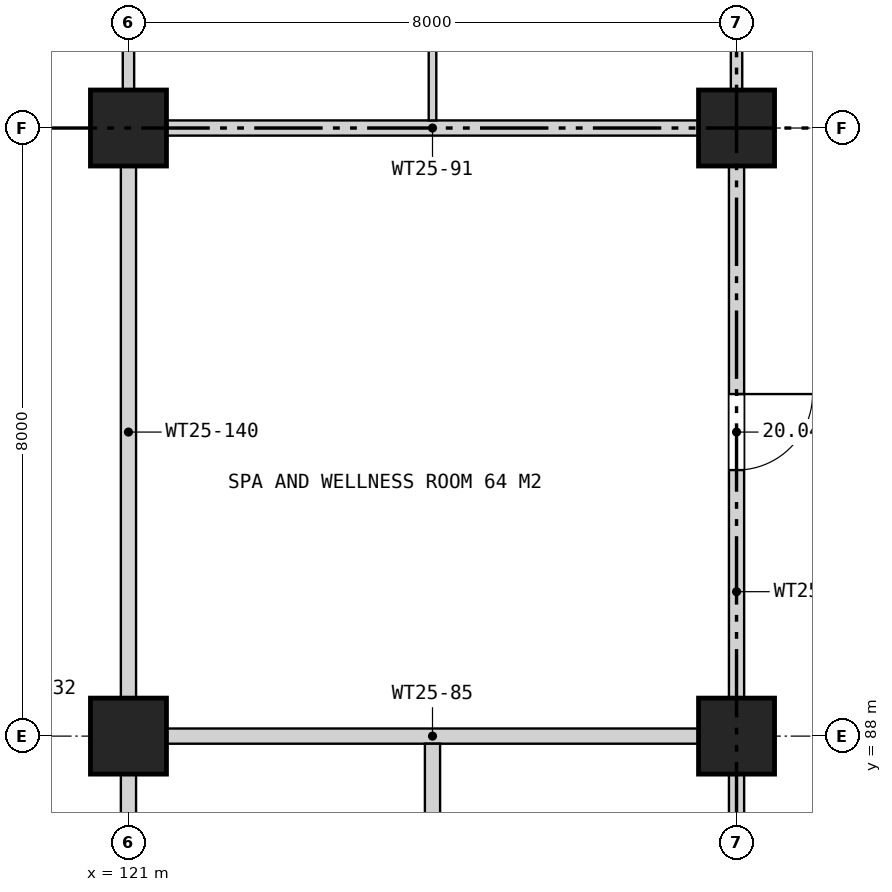
"""IFC4 building model, lengths in metres.
Left out: names, types, materials, properties, quantities, classifications, styles, units other than length and angle.
Written with IfcOpenShell. Run it as: python <this file> out.ifc"""

import sys

from ifc_helpers import new_model, si_unit, direction, frame, frame_2d, origin, origin_2d, place, context, subcontext, project, spatial, rectangle, extrude, element, fill, save


model = new_model("IFC4")
c1 = context("Model", 3, precision=1e-05, world=origin(), true_north=direction((0.0, 1.0)))
c2 = subcontext(c1, "Body", "Model", "MODEL_VIEW")
j1 = project(units=[si_unit("LENGTHUNIT", "METRE"), si_unit("PLANEANGLEUNIT", "RADIAN")], contexts=[c1])
p1 = place(None, origin())
s1 = spatial("IfcSite", under=j1, at=p1, CompositionType="ELEMENT")
p2 = place(p1, origin())
s2 = spatial("IfcBuilding", under=s1, at=p2, CompositionType="ELEMENT")
p3 = place(p2, frame((0.0, 0.0, 101.6)))
s3 = spatial("IfcBuildingStorey", under=s2, at=p3, CompositionType="ELEMENT", Elevation=101.6)
for number, where, z_axis, x_axis in (
    (1, (121.0, 88.0, 0.0), (0.0, 0.0, 1.0), (1.0, 0.0, 0.0)),
    (2, (121.0, 96.0, 0.0), (0.0, 0.0, 1.0), (1.0, 0.0, 0.0)),
    (3, (129.0, 88.0, 0.0), (0.0, 0.0, 1.0), (1.0, 0.0, 0.0)),
    (4, (129.0, 96.0, 0.0), (0.0, 0.0, 1.0), (1.0, 0.0, 0.0)),
):
    element("IfcColumn", number, at=place(p3, frame(where, z_axis=z_axis, x_axis=x_axis)), inside=s3, PredefinedType="COLUMN", context=c2, shape_type="SweptSolid", body=[
        extrude(rectangle(XDim=1.0, YDim=1.0, at=origin_2d()), origin(), (0.0, 0.0, 1.0), 3.7),
    ])
p4 = place(p3, frame((121.5, 88.0, 0.0), z_axis=(0.0, 0.0, 1.0), x_axis=(1.0, 0.0, 0.0)))
e5 = element("IfcWall", 5, at=p4, inside=s3, PredefinedType="PARTITIONING", context=c2, shape_type="SweptSolid", body=[
    extrude(rectangle(XDim=7.0, YDim=0.2, at=frame_2d((3.5, 0.0))), origin(), (0.0, 0.0, 1.0), 3.7),
])
p5 = place(p3, frame((121.5, 96.0, 0.0), z_axis=(0.0, 0.0, 1.0), x_axis=(1.0, 0.0, 0.0)))
e6 = element("IfcWall", 6, at=p5, inside=s3, PredefinedType="PARTITIONING", context=c2, shape_type="SweptSolid", body=[
    extrude(rectangle(XDim=7.0, YDim=0.2, at=frame_2d((3.5, 0.0))), origin(), (0.0, 0.0, 1.0), 2.76),
])
p6 = place(p3, frame((121.0, 80.5, 0.0), z_axis=(0.0, 0.0, 1.0), x_axis=(0.0, 1.0, 0.0)))
e7 = element("IfcWall", 7, at=p6, inside=s3, PredefinedType="PARTITIONING", context=c2, shape_type="SweptSolid", body=[
    extrude(rectangle(XDim=7.0, YDim=0.2, at=frame_2d((3.5, 0.0))), origin(), (0.0, 0.0, 1.0), 2.76),
])
p7 = place(p6, frame((3.0, 0.0, 0.0)))
e8 = element("IfcOpeningElement", 8, at=p7, cuts=e7, PredefinedType="OPENING", context=c2, shape_type="SweptSolid", body=[
    extrude(rectangle(XDim=1.0, YDim=2.1, at=frame_2d((0.5, 1.05))), frame((0.0, 0.11, 0.0), z_axis=(0.0, -1.0, 0.0), x_axis=(1.0, 0.0, 0.0)), (0.0, 0.0, 1.0), 0.22),
])
p8 = place(p3, frame((121.0, 88.5, 0.0), z_axis=(0.0, 0.0, 1.0), x_axis=(0.0, 1.0, 0.0)))
e9 = element("IfcWall", 9, at=p8, inside=s3, PredefinedType="PARTITIONING", context=c2, shape_type="SweptSolid", body=[
    extrude(rectangle(XDim=7.0, YDim=0.2, at=frame_2d((3.5, 0.0))), origin(), (0.0, 0.0, 1.0), 2.76),
])
p9 = place(p3, frame((121.0, 96.5, 0.0), z_axis=(0.0, 0.0, 1.0), x_axis=(0.0, 1.0, 0.0)))
e10 = element("IfcWall", 10, at=p9, inside=s3, PredefinedType="PARTITIONING", context=c2, shape_type="SweptSolid", body=[
    extrude(rectangle(XDim=7.0, YDim=0.15, at=frame_2d((3.5, 0.0))), origin(), (0.0, 0.0, 1.0), 2.76),
])
p10 = place(p9, frame((1.0, 0.0, 0.0)))
e11 = element("IfcOpeningElement", 11, at=p10, cuts=e10, PredefinedType="OPENING", context=c2, shape_type="SweptSolid", body=[
    extrude(rectangle(XDim=1.0, YDim=2.1, at=frame_2d((0.5, 1.05))), frame((0.0, 0.085, 0.0), z_axis=(0.0, -1.0, 0.0), x_axis=(1.0, 0.0, 0.0)), (0.0, 0.0, 1.0), 0.17),
])
p11 = place(p9, frame((5.0, 0.0, 0.0)))
e12 = element("IfcOpeningElement", 12, at=p11, cuts=e10, PredefinedType="OPENING", context=c2, shape_type="SweptSolid", body=[
    extrude(rectangle(XDim=1.0, YDim=2.1, at=frame_2d((0.5, 1.05))), frame((0.0, 0.085, 0.0), z_axis=(0.0, -1.0, 0.0), x_axis=(1.0, 0.0, 0.0)), (0.0, 0.0, 1.0), 0.17),
])
p12 = place(p3, frame((125.0, 80.1, 0.0), z_axis=(0.0, 0.0, 1.0), x_axis=(0.0, 1.0, 0.0)))
e13 = element("IfcWall", 13, at=p12, inside=s3, PredefinedType="PARTITIONING", context=c2, shape_type="SweptSolid", body=[
    extrude(rectangle(XDim=7.8, YDim=0.2, at=frame_2d((3.9, 0.0))), origin(), (0.0, 0.0, 1.0), 2.843),
])
p13 = place(p3, frame((125.0, 96.1, 0.0), z_axis=(0.0, 0.0, 1.0), x_axis=(0.0, 1.0, 0.0)))
e14 = element("IfcWall", 14, at=p13, inside=s3, PredefinedType="PARTITIONING", context=c2, shape_type="SweptSolid", body=[
    extrude(rectangle(XDim=3.85, YDim=0.1, at=frame_2d((1.925, 0.0))), origin(), (0.0, 0.0, 1.0), 3.7),
])
p14 = place(p3, frame((129.0, 80.5, 0.0), z_axis=(0.0, 0.0, 1.0), x_axis=(0.0, 1.0, 0.0)))
e15 = element("IfcWall", 15, at=p14, inside=s3, PredefinedType="PARTITIONING", context=c2, shape_type="SweptSolid", body=[
    extrude(rectangle(XDim=7.0, YDim=0.2, at=frame_2d((3.5, 0.0))), origin(), (0.0, 0.0, 1.0), 2.76),
])
p15 = place(p14, frame((3.0, 0.0, 0.0)))
e16 = element("IfcOpeningElement", 16, at=p15, cuts=e15, PredefinedType="OPENING", context=c2, shape_type="SweptSolid", body=[
    extrude(rectangle(XDim=1.0, YDim=2.1, at=frame_2d((0.5, 1.05))), frame((0.0, 0.11, 0.0), z_axis=(0.0, -1.0, 0.0), x_axis=(1.0, 0.0, 0.0)), (0.0, 0.0, 1.0), 0.22),
])
p16 = place(p3, frame((129.0, 88.5, 0.0), z_axis=(0.0, 0.0, 1.0), x_axis=(0.0, 1.0, 0.0)))
e17 = element("IfcWall", 17, at=p16, inside=s3, PredefinedType="PARTITIONING", context=c2, shape_type="SweptSolid", body=[
    extrude(rectangle(XDim=7.0, YDim=0.2, at=frame_2d((3.5, 0.0))), origin(), (0.0, 0.0, 1.0), 2.76),
])
p17 = place(p16, frame((3.0, 0.0, 0.0)))
e18 = element("IfcOpeningElement", 18, at=p17, cuts=e17, PredefinedType="OPENING", context=c2, shape_type="SweptSolid", body=[
    extrude(rectangle(XDim=1.0, YDim=2.1, at=frame_2d((0.5, 1.05))), frame((0.0, 0.11, 0.0), z_axis=(0.0, -1.0, 0.0), x_axis=(1.0, 0.0, 0.0)), (0.0, 0.0, 1.0), 0.22),
])
p18 = place(p3, frame((129.0, 96.5, 0.0), z_axis=(0.0, 0.0, 1.0), x_axis=(0.0, 1.0, 0.0)))
e19 = element("IfcWall", 19, at=p18, inside=s3, PredefinedType="PARTITIONING", context=c2, shape_type="SweptSolid", body=[
    extrude(rectangle(XDim=7.0, YDim=0.15, at=frame_2d((3.5, 0.0))), origin(), (0.0, 0.0, 1.0), 2.76),
])
p19 = place(p18, frame((1.0, 0.0, 0.0)))
e20 = element("IfcOpeningElement", 20, at=p19, cuts=e19, PredefinedType="OPENING", context=c2, shape_type="SweptSolid", body=[
    extrude(rectangle(XDim=1.0, YDim=2.1, at=frame_2d((0.5, 1.05))), frame((0.0, 0.085, 0.0), z_axis=(0.0, -1.0, 0.0), x_axis=(1.0, 0.0, 0.0)), (0.0, 0.0, 1.0), 0.17),
])
p20 = place(p18, frame((5.0, 0.0, 0.0)))
e21 = element("IfcOpeningElement", 21, at=p20, cuts=e19, PredefinedType="OPENING", context=c2, shape_type="SweptSolid", body=[
    extrude(rectangle(XDim=1.0, YDim=2.1, at=frame_2d((0.5, 1.05))), frame((0.0, 0.085, 0.0), z_axis=(0.0, -1.0, 0.0), x_axis=(1.0, 0.0, 0.0)), (0.0, 0.0, 1.0), 0.17),
])
p21 = place(p17, frame((1.0, 0.0, 0.0), z_axis=(0.0, 0.0, 1.0), x_axis=(-1.0, 0.0, 0.0)))
e22 = element("IfcDoor", 22, at=p21, inside=s3, OperationType="SINGLE_SWING_LEFT", PredefinedType="DOOR", context=c2, shape_type="SweptSolid", body=[
    extrude(rectangle(XDim=1.0, YDim=2.1, at=frame_2d((0.5, 1.05))), frame((0.0, 0.025, 0.0), z_axis=(0.0, -1.0, 0.0), x_axis=(1.0, 0.0, 0.0)), (0.0, 0.0, 1.0), 0.05),
])
fill(e18, e22)
save(model, sys.argv[1])
